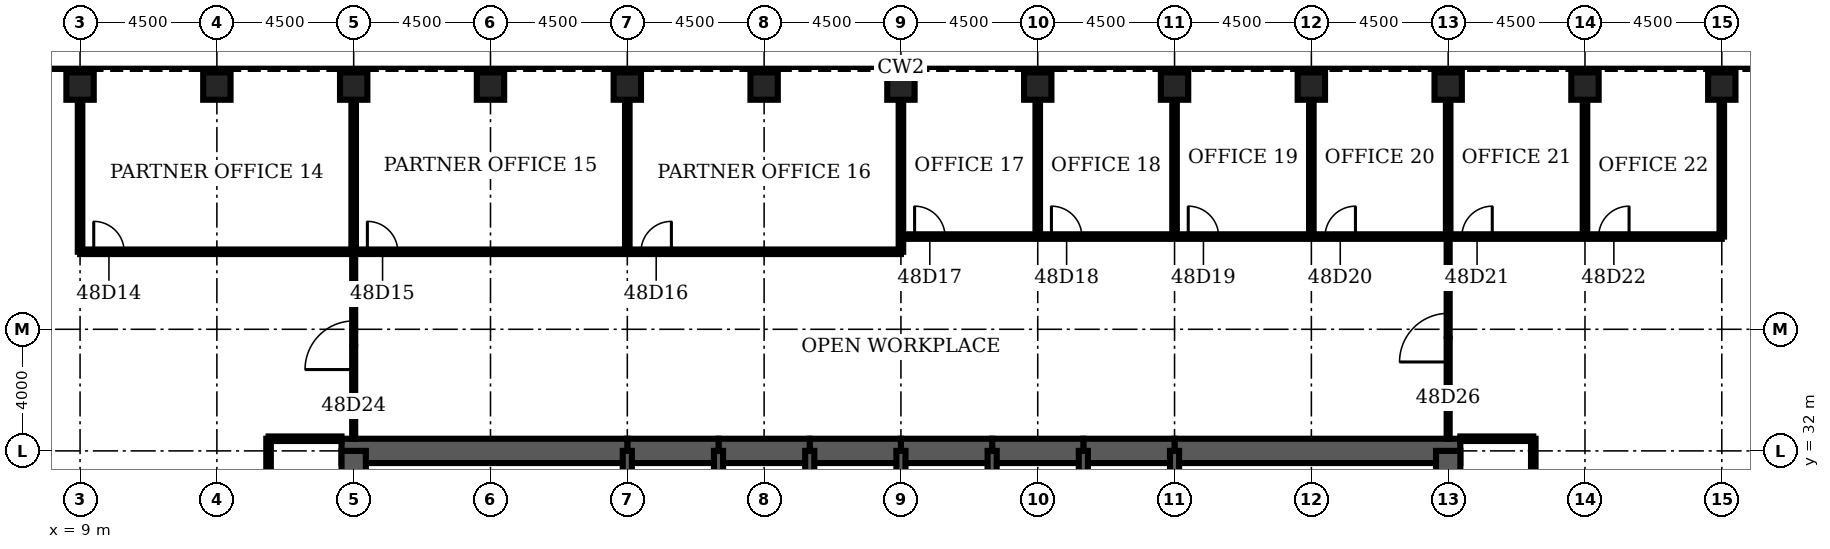
"""IFC4 building model, lengths in metres.
Left out: names, types, materials, properties, quantities, classifications, styles, units other than length and angle.
Written with IfcOpenShell. Run it as: python <this file> out.ifc"""

import sys

from ifc_helpers import new_model, si_unit, direction, frame, frame_2d, origin, origin_2d, place, context, subcontext, project, spatial, rectangle, hollow_rectangle, extrude, element, fill, save


model = new_model("IFC4")
c1 = context("Model", 3, precision=1e-05, world=origin(), true_north=direction((0.0, 1.0)))
c2 = subcontext(c1, "Body", "Model", "MODEL_VIEW")
j1 = project(units=[si_unit("LENGTHUNIT", "METRE"), si_unit("PLANEANGLEUNIT", "RADIAN")], contexts=[c1])
p1 = place(None, origin())
s1 = spatial("IfcSite", under=j1, at=p1, CompositionType="ELEMENT")
p2 = place(p1, origin())
s2 = spatial("IfcBuilding", under=s1, at=p2, CompositionType="ELEMENT")
p3 = place(p2, frame((0.0, 0.0, 215.2)))
s3 = spatial("IfcBuildingStorey", under=s2, at=p3, CompositionType="ELEMENT", Elevation=215.2)
for number, where, z_axis, x_axis in (
    (1, (63.0, 44.0, 0.0), (0.0, 0.0, 1.0), (0.0, 1.0, 0.0)),
    (2, (58.5, 44.0, 0.0), (0.0, 0.0, 1.0), (0.0, 1.0, 0.0)),
    (3, (54.0, 44.0, 0.0), (0.0, 0.0, 1.0), (0.0, 1.0, 0.0)),
    (4, (49.5, 44.0, 0.0), (0.0, 0.0, 1.0), (0.0, 1.0, 0.0)),
    (5, (45.0, 44.0, 0.0), (0.0, 0.0, 1.0), (0.0, 1.0, 0.0)),
    (6, (40.5, 44.0, 0.0), (0.0, 0.0, 1.0), (0.0, 1.0, 0.0)),
    (7, (36.0, 44.0, 0.0), (0.0, 0.0, 1.0), (0.0, 1.0, 0.0)),
    (8, (31.5, 44.0, 0.0), (0.0, 0.0, 1.0), (0.0, 1.0, 0.0)),
    (9, (27.0, 44.0, 0.0), (0.0, 0.0, 1.0), (0.0, 1.0, 0.0)),
    (10, (22.5, 44.0, 0.0), (0.0, 0.0, 1.0), (0.0, 1.0, 0.0)),
    (11, (18.0, 44.0, 0.0), (0.0, 0.0, 1.0), (0.0, 1.0, 0.0)),
    (12, (13.5, 44.0, 0.0), (0.0, 0.0, 1.0), (0.0, 1.0, 0.0)),
    (13, (9.0, 44.0, 0.0), (0.0, 0.0, 1.0), (0.0, 1.0, 0.0)),
):
    element("IfcColumn", number, at=place(p3, frame(where, z_axis=z_axis, x_axis=x_axis)), inside=s3, PredefinedType="COLUMN", context=c2, shape_type="SweptSolid", body=[
        extrude(hollow_rectangle(XDim=0.9, YDim=0.9, WallThickness=0.08, at=origin_2d()), origin(), (0.0, 0.0, 1.0), 4.2),
    ])
p4 = place(p3, frame((54.4, 32.0, 0.0), z_axis=(0.0, 0.0, 1.0), x_axis=(-1.0, 0.0, 0.0)))
e14 = element("IfcWall", 14, at=p4, inside=s3, PredefinedType="SHEAR", context=c2, shape_type="SweptSolid", body=[
    extrude(rectangle(XDim=9.4, YDim=0.8, at=frame_2d((4.7, 0.0))), origin(), (0.0, 0.0, 1.0), 4.2),
])
for number, where, z_axis, x_axis in (
    (15, (45.0, 32.0, 0.0), (0.0, 0.0, 1.0), (-1.0, 0.0, 0.0)),
    (16, (42.0, 32.0, 0.0), (0.0, 0.0, 1.0), (-1.0, 0.0, 0.0)),
    (17, (39.0, 32.0, 0.0), (0.0, 0.0, 1.0), (-1.0, 0.0, 0.0)),
    (18, (36.0, 32.0, 0.0), (0.0, 0.0, 1.0), (-1.0, 0.0, 0.0)),
    (19, (33.0, 32.0, 0.0), (0.0, 0.0, 1.0), (-1.0, 0.0, 0.0)),
    (20, (30.0, 32.0, 0.0), (0.0, 0.0, 1.0), (-1.0, 0.0, 0.0)),
):
    element("IfcWall", number, at=place(p3, frame(where, z_axis=z_axis, x_axis=x_axis)), inside=s3, PredefinedType="SHEAR", context=c2, shape_type="SweptSolid", body=[
        extrude(rectangle(XDim=3.0, YDim=0.8, at=frame_2d((1.5, 0.0))), origin(), (0.0, 0.0, 1.0), 4.2),
    ])
p5 = place(p3, frame((27.0, 32.0, 0.0), z_axis=(0.0, 0.0, 1.0), x_axis=(-1.0, 0.0, 0.0)))
e21 = element("IfcWall", 21, at=p5, inside=s3, PredefinedType="SHEAR", context=c2, shape_type="SweptSolid", body=[
    extrude(rectangle(XDim=9.4, YDim=0.8, at=frame_2d((4.7, 0.0))), origin(), (0.0, 0.0, 1.0), 4.2),
])
for number, where, z_axis, x_axis in (
    (22, (18.0, 32.0, 0.0), (0.0, 0.0, 1.0), (0.0, -1.0, 0.0)),
    (23, (54.0, 28.8, 0.0), (0.0, 0.0, 1.0), (0.0, 1.0, 0.0)),
):
    element("IfcWall", number, at=place(p3, frame(where, z_axis=z_axis, x_axis=x_axis)), inside=s3, PredefinedType="SHEAR", context=c2, shape_type="SweptSolid", body=[
        extrude(rectangle(XDim=3.2, YDim=0.8, at=frame_2d((1.6, 0.0))), origin(), (0.0, 0.0, 1.0), 4.2),
    ])
for number, where, z_axis, x_axis in (
    (24, (27.0, 28.8, 0.0), (0.0, 0.0, 1.0), (0.0, 1.0, 0.0)),
    (25, (30.0, 28.8, 0.0), (0.0, 0.0, 1.0), (0.0, 1.0, 0.0)),
    (26, (33.0, 28.8, 0.0), (0.0, 0.0, 1.0), (0.0, 1.0, 0.0)),
    (27, (36.0, 28.8, 0.0), (0.0, 0.0, 1.0), (0.0, 1.0, 0.0)),
    (28, (39.0, 28.8, 0.0), (0.0, 0.0, 1.0), (0.0, 1.0, 0.0)),
    (29, (42.0, 28.8, 0.0), (0.0, 0.0, 1.0), (0.0, 1.0, 0.0)),
    (30, (45.0, 28.8, 0.0), (0.0, 0.0, 1.0), (0.0, 1.0, 0.0)),
):
    element("IfcWall", number, at=place(p3, frame(where, z_axis=z_axis, x_axis=x_axis)), inside=s3, PredefinedType="SOLIDWALL", context=c2, shape_type="SweptSolid", body=[
        extrude(rectangle(XDim=3.2, YDim=0.3, at=frame_2d((1.6, 0.0))), origin(), (0.0, 0.0, 1.0), 4.2),
    ])
for number, where, z_axis, x_axis in (
    (31, (15.2, 32.4, 0.0), (0.0, 0.0, 1.0), (1.0, 0.0, 0.0)),
    (32, (54.4, 32.4, 0.0), (0.0, 0.0, 1.0), (1.0, 0.0, 0.0)),
):
    element("IfcWall", number, at=place(p3, frame(where, z_axis=z_axis, x_axis=x_axis)), inside=s3, PredefinedType="PARTITIONING", context=c2, shape_type="SweptSolid", body=[
        extrude(rectangle(XDim=2.4, YDim=0.15, at=frame_2d((1.2, 0.0))), origin(), (0.0, 0.0, 1.0), 3.0),
    ])
p6 = place(p3, frame((9.0, 38.55, 0.0), z_axis=(0.0, 0.0, 1.0), x_axis=(1.0, 0.0, 0.0)))
e33 = element("IfcWall", 33, at=p6, inside=s3, PredefinedType="PARTITIONING", context=c2, shape_type="SweptSolid", body=[
    extrude(rectangle(XDim=27.0, YDim=0.15, at=frame_2d((13.5, 0.0))), origin(), (0.0, 0.0, 1.0), 3.0),
])
p7 = place(p6, frame((0.45, 0.0, 0.0)))
e34 = element("IfcOpeningElement", 34, at=p7, cuts=e33, PredefinedType="OPENING", context=c2, shape_type="SweptSolid", body=[
    extrude(rectangle(XDim=1.0, YDim=2.1, at=frame_2d((0.5, 1.05))), frame((0.0, 0.085, 0.0), z_axis=(0.0, -1.0, 0.0), x_axis=(1.0, 0.0, 0.0)), (0.0, 0.0, 1.0), 0.17),
])
p8 = place(p6, frame((9.45, 0.0, 0.0)))
e35 = element("IfcOpeningElement", 35, at=p8, cuts=e33, PredefinedType="OPENING", context=c2, shape_type="SweptSolid", body=[
    extrude(rectangle(XDim=1.0, YDim=2.1, at=frame_2d((0.5, 1.05))), frame((0.0, 0.085, 0.0), z_axis=(0.0, -1.0, 0.0), x_axis=(1.0, 0.0, 0.0)), (0.0, 0.0, 1.0), 0.17),
])
p9 = place(p6, frame((18.45, 0.0, 0.0)))
e36 = element("IfcOpeningElement", 36, at=p9, cuts=e33, PredefinedType="OPENING", context=c2, shape_type="SweptSolid", body=[
    extrude(rectangle(XDim=1.0, YDim=2.1, at=frame_2d((0.5, 1.05))), frame((0.0, 0.085, 0.0), z_axis=(0.0, -1.0, 0.0), x_axis=(1.0, 0.0, 0.0)), (0.0, 0.0, 1.0), 0.17),
])
p10 = place(p3, frame((36.0, 39.05, 0.0), z_axis=(0.0, 0.0, 1.0), x_axis=(1.0, 0.0, 0.0)))
e37 = element("IfcWall", 37, at=p10, inside=s3, PredefinedType="PARTITIONING", context=c2, shape_type="SweptSolid", body=[
    extrude(rectangle(XDim=27.0, YDim=0.15, at=frame_2d((13.5, 0.0))), origin(), (0.0, 0.0, 1.0), 3.0),
])
p11 = place(p10, frame((0.45, 0.0, 0.0)))
e38 = element("IfcOpeningElement", 38, at=p11, cuts=e37, PredefinedType="OPENING", context=c2, shape_type="SweptSolid", body=[
    extrude(rectangle(XDim=1.0, YDim=2.1, at=frame_2d((0.5, 1.05))), frame((0.0, 0.085, 0.0), z_axis=(0.0, -1.0, 0.0), x_axis=(1.0, 0.0, 0.0)), (0.0, 0.0, 1.0), 0.17),
])
p12 = place(p10, frame((4.95, 0.0, 0.0)))
e39 = element("IfcOpeningElement", 39, at=p12, cuts=e37, PredefinedType="OPENING", context=c2, shape_type="SweptSolid", body=[
    extrude(rectangle(XDim=1.0, YDim=2.1, at=frame_2d((0.5, 1.05))), frame((0.0, 0.085, 0.0), z_axis=(0.0, -1.0, 0.0), x_axis=(1.0, 0.0, 0.0)), (0.0, 0.0, 1.0), 0.17),
])
p13 = place(p10, frame((9.45, 0.0, 0.0)))
e40 = element("IfcOpeningElement", 40, at=p13, cuts=e37, PredefinedType="OPENING", context=c2, shape_type="SweptSolid", body=[
    extrude(rectangle(XDim=1.0, YDim=2.1, at=frame_2d((0.5, 1.05))), frame((0.0, 0.085, 0.0), z_axis=(0.0, -1.0, 0.0), x_axis=(1.0, 0.0, 0.0)), (0.0, 0.0, 1.0), 0.17),
])
p14 = place(p10, frame((13.95, 0.0, 0.0)))
e41 = element("IfcOpeningElement", 41, at=p14, cuts=e37, PredefinedType="OPENING", context=c2, shape_type="SweptSolid", body=[
    extrude(rectangle(XDim=1.0, YDim=2.1, at=frame_2d((0.5, 1.05))), frame((0.0, 0.085, 0.0), z_axis=(0.0, -1.0, 0.0), x_axis=(1.0, 0.0, 0.0)), (0.0, 0.0, 1.0), 0.17),
])
p15 = place(p10, frame((18.45, 0.0, 0.0)))
e42 = element("IfcOpeningElement", 42, at=p15, cuts=e37, PredefinedType="OPENING", context=c2, shape_type="SweptSolid", body=[
    extrude(rectangle(XDim=1.0, YDim=2.1, at=frame_2d((0.5, 1.05))), frame((0.0, 0.085, 0.0), z_axis=(0.0, -1.0, 0.0), x_axis=(1.0, 0.0, 0.0)), (0.0, 0.0, 1.0), 0.17),
])
p16 = place(p10, frame((22.95, 0.0, 0.0)))
e43 = element("IfcOpeningElement", 43, at=p16, cuts=e37, PredefinedType="OPENING", context=c2, shape_type="SweptSolid", body=[
    extrude(rectangle(XDim=1.0, YDim=2.1, at=frame_2d((0.5, 1.05))), frame((0.0, 0.085, 0.0), z_axis=(0.0, -1.0, 0.0), x_axis=(1.0, 0.0, 0.0)), (0.0, 0.0, 1.0), 0.17),
])
p17 = place(p3, frame((9.0, 38.55, 0.0), z_axis=(0.0, 0.0, 1.0), x_axis=(0.0, 1.0, 0.0)))
e44 = element("IfcWall", 44, at=p17, inside=s3, PredefinedType="PARTITIONING", context=c2, shape_type="SweptSolid", body=[
    extrude(rectangle(XDim=5.0, YDim=0.15, at=frame_2d((2.5, 0.0))), origin(), (0.0, 0.0, 1.0), 3.0),
])
p18 = place(p3, frame((15.2, 13.8, 0.0), z_axis=(0.0, 0.0, 1.0), x_axis=(0.0, 1.0, 0.0)))
e45 = element("IfcWall", 45, at=p18, inside=s3, PredefinedType="PARTITIONING", context=c2, shape_type="SweptSolid", body=[
    extrude(rectangle(XDim=18.6, YDim=0.15, at=frame_2d((9.3, 0.0))), origin(), (0.0, 0.0, 1.0), 3.0),
])
p19 = place(p18, frame((8.7, 0.0, 0.0)))
e46 = element("IfcOpeningElement", 46, at=p19, cuts=e45, PredefinedType="OPENING", context=c2, shape_type="SweptSolid", body=[
    extrude(rectangle(XDim=1.2, YDim=2.1, at=frame_2d((0.6, 1.05))), frame((0.0, 0.085, 0.0), z_axis=(0.0, -1.0, 0.0), x_axis=(1.0, 0.0, 0.0)), (0.0, 0.0, 1.0), 0.17),
])
p20 = place(p3, frame((18.0, 32.4, 0.0), z_axis=(0.0, 0.0, 1.0), x_axis=(0.0, 1.0, 0.0)))
e47 = element("IfcWall", 47, at=p20, inside=s3, PredefinedType="PARTITIONING", context=c2, shape_type="SweptSolid", body=[
    extrude(rectangle(XDim=6.15, YDim=0.1, at=frame_2d((3.075, 0.0))), origin(), (0.0, 0.0, 1.0), 3.0),
])
p21 = place(p20, frame((2.275, 0.0, 0.0)))
e48 = element("IfcOpeningElement", 48, at=p21, cuts=e47, PredefinedType="OPENING", context=c2, shape_type="SweptSolid", body=[
    extrude(rectangle(XDim=1.6, YDim=2.1, at=frame_2d((0.8, 1.05))), frame((0.0, 0.06, 0.0), z_axis=(0.0, -1.0, 0.0), x_axis=(1.0, 0.0, 0.0)), (0.0, 0.0, 1.0), 0.12),
])
for number, where, z_axis, x_axis in (
    (49, (18.0, 38.55, 0.0), (0.0, 0.0, 1.0), (0.0, 1.0, 0.0)),
    (50, (27.0, 38.55, 0.0), (0.0, 0.0, 1.0), (0.0, 1.0, 0.0)),
    (51, (36.0, 38.55, 0.0), (0.0, 0.0, 1.0), (0.0, 1.0, 0.0)),
):
    element("IfcWall", number, at=place(p3, frame(where, z_axis=z_axis, x_axis=x_axis)), inside=s3, PredefinedType="PARTITIONING", context=c2, shape_type="SweptSolid", body=[
        extrude(rectangle(XDim=5.0, YDim=0.15, at=frame_2d((2.5, 0.0))), origin(), (0.0, 0.0, 1.0), 3.0),
    ])
for number, where, z_axis, x_axis in (
    (52, (40.5, 39.05, 0.0), (0.0, 0.0, 1.0), (0.0, 1.0, 0.0)),
    (53, (45.0, 39.05, 0.0), (0.0, 0.0, 1.0), (0.0, 1.0, 0.0)),
    (54, (49.5, 39.05, 0.0), (0.0, 0.0, 1.0), (0.0, 1.0, 0.0)),
):
    element("IfcWall", number, at=place(p3, frame(where, z_axis=z_axis, x_axis=x_axis)), inside=s3, PredefinedType="PARTITIONING", context=c2, shape_type="SweptSolid", body=[
        extrude(rectangle(XDim=4.5, YDim=0.15, at=frame_2d((2.25, 0.0))), origin(), (0.0, 0.0, 1.0), 3.0),
    ])
p22 = place(p3, frame((54.0, 32.4, 0.0), z_axis=(0.0, 0.0, 1.0), x_axis=(0.0, 1.0, 0.0)))
e55 = element("IfcWall", 55, at=p22, inside=s3, PredefinedType="PARTITIONING", context=c2, shape_type="SweptSolid", body=[
    extrude(rectangle(XDim=6.65, YDim=0.1, at=frame_2d((3.325, 0.0))), origin(), (0.0, 0.0, 1.0), 3.0),
])
p23 = place(p22, frame((2.525, 0.0, 0.0)))
e56 = element("IfcOpeningElement", 56, at=p23, cuts=e55, PredefinedType="OPENING", context=c2, shape_type="SweptSolid", body=[
    extrude(rectangle(XDim=1.6, YDim=2.1, at=frame_2d((0.8, 1.05))), frame((0.0, 0.06, 0.0), z_axis=(0.0, -1.0, 0.0), x_axis=(1.0, 0.0, 0.0)), (0.0, 0.0, 1.0), 0.12),
])
p24 = place(p3, frame((54.0, 39.05, 0.0), z_axis=(0.0, 0.0, 1.0), x_axis=(0.0, 1.0, 0.0)))
e57 = element("IfcWall", 57, at=p24, inside=s3, PredefinedType="PARTITIONING", context=c2, shape_type="SweptSolid", body=[
    extrude(rectangle(XDim=4.5, YDim=0.15, at=frame_2d((2.25, 0.0))), origin(), (0.0, 0.0, 1.0), 3.0),
])
p25 = place(p3, frame((56.8, 13.8, 0.0), z_axis=(0.0, 0.0, 1.0), x_axis=(0.0, 1.0, 0.0)))
e58 = element("IfcWall", 58, at=p25, inside=s3, PredefinedType="PARTITIONING", context=c2, shape_type="SweptSolid", body=[
    extrude(rectangle(XDim=18.6, YDim=0.15, at=frame_2d((9.3, 0.0))), origin(), (0.0, 0.0, 1.0), 3.0),
])
p26 = place(p25, frame((8.7, 0.0, 0.0)))
e59 = element("IfcOpeningElement", 59, at=p26, cuts=e58, PredefinedType="OPENING", context=c2, shape_type="SweptSolid", body=[
    extrude(rectangle(XDim=1.2, YDim=2.1, at=frame_2d((0.6, 1.05))), frame((0.0, 0.085, 0.0), z_axis=(0.0, -1.0, 0.0), x_axis=(1.0, 0.0, 0.0)), (0.0, 0.0, 1.0), 0.17),
])
for number, where, z_axis, x_axis in (
    (60, (58.5, 39.05, 0.0), (0.0, 0.0, 1.0), (0.0, 1.0, 0.0)),
    (61, (63.0, 39.05, 0.0), (0.0, 0.0, 1.0), (0.0, 1.0, 0.0)),
):
    element("IfcWall", number, at=place(p3, frame(where, z_axis=z_axis, x_axis=x_axis)), inside=s3, PredefinedType="PARTITIONING", context=c2, shape_type="SweptSolid", body=[
        extrude(rectangle(XDim=4.5, YDim=0.15, at=frame_2d((2.25, 0.0))), origin(), (0.0, 0.0, 1.0), 3.0),
    ])
p27 = place(p7, origin())
e62 = element("IfcDoor", 62, at=p27, inside=s3, OperationType="SINGLE_SWING_LEFT", PredefinedType="DOOR", context=c2, shape_type="SweptSolid", body=[
    extrude(rectangle(XDim=1.0, YDim=2.1, at=frame_2d((0.5, 1.05))), frame((0.0, 0.025, 0.0), z_axis=(0.0, -1.0, 0.0), x_axis=(1.0, 0.0, 0.0)), (0.0, 0.0, 1.0), 0.05),
])
fill(e34, e62)
p28 = place(p8, origin())
e63 = element("IfcDoor", 63, at=p28, inside=s3, OperationType="SINGLE_SWING_LEFT", PredefinedType="DOOR", context=c2, shape_type="SweptSolid", body=[
    extrude(rectangle(XDim=1.0, YDim=2.1, at=frame_2d((0.5, 1.05))), frame((0.0, 0.025, 0.0), z_axis=(0.0, -1.0, 0.0), x_axis=(1.0, 0.0, 0.0)), (0.0, 0.0, 1.0), 0.05),
])
fill(e35, e63)
p29 = place(p9, origin())
e64 = element("IfcDoor", 64, at=p29, inside=s3, OperationType="SINGLE_SWING_RIGHT", PredefinedType="DOOR", context=c2, shape_type="SweptSolid", body=[
    extrude(rectangle(XDim=1.0, YDim=2.1, at=frame_2d((0.5, 1.05))), frame((0.0, 0.025, 0.0), z_axis=(0.0, -1.0, 0.0), x_axis=(1.0, 0.0, 0.0)), (0.0, 0.0, 1.0), 0.05),
])
fill(e36, e64)
p30 = place(p11, origin())
e65 = element("IfcDoor", 65, at=p30, inside=s3, OperationType="SINGLE_SWING_LEFT", PredefinedType="DOOR", context=c2, shape_type="SweptSolid", body=[
    extrude(rectangle(XDim=1.0, YDim=2.1, at=frame_2d((0.5, 1.05))), frame((0.0, 0.025, 0.0), z_axis=(0.0, -1.0, 0.0), x_axis=(1.0, 0.0, 0.0)), (0.0, 0.0, 1.0), 0.05),
])
fill(e38, e65)
p31 = place(p12, origin())
e66 = element("IfcDoor", 66, at=p31, inside=s3, OperationType="SINGLE_SWING_LEFT", PredefinedType="DOOR", context=c2, shape_type="SweptSolid", body=[
    extrude(rectangle(XDim=1.0, YDim=2.1, at=frame_2d((0.5, 1.05))), frame((0.0, 0.025, 0.0), z_axis=(0.0, -1.0, 0.0), x_axis=(1.0, 0.0, 0.0)), (0.0, 0.0, 1.0), 0.05),
])
fill(e39, e66)
p32 = place(p13, origin())
e67 = element("IfcDoor", 67, at=p32, inside=s3, OperationType="SINGLE_SWING_LEFT", PredefinedType="DOOR", context=c2, shape_type="SweptSolid", body=[
    extrude(rectangle(XDim=1.0, YDim=2.1, at=frame_2d((0.5, 1.05))), frame((0.0, 0.025, 0.0), z_axis=(0.0, -1.0, 0.0), x_axis=(1.0, 0.0, 0.0)), (0.0, 0.0, 1.0), 0.05),
])
fill(e40, e67)
p33 = place(p14, origin())
e68 = element("IfcDoor", 68, at=p33, inside=s3, OperationType="SINGLE_SWING_RIGHT", PredefinedType="DOOR", context=c2, shape_type="SweptSolid", body=[
    extrude(rectangle(XDim=1.0, YDim=2.1, at=frame_2d((0.5, 1.05))), frame((0.0, 0.025, 0.0), z_axis=(0.0, -1.0, 0.0), x_axis=(1.0, 0.0, 0.0)), (0.0, 0.0, 1.0), 0.05),
])
fill(e41, e68)
p34 = place(p15, origin())
e69 = element("IfcDoor", 69, at=p34, inside=s3, OperationType="SINGLE_SWING_RIGHT", PredefinedType="DOOR", context=c2, shape_type="SweptSolid", body=[
    extrude(rectangle(XDim=1.0, YDim=2.1, at=frame_2d((0.5, 1.05))), frame((0.0, 0.025, 0.0), z_axis=(0.0, -1.0, 0.0), x_axis=(1.0, 0.0, 0.0)), (0.0, 0.0, 1.0), 0.05),
])
fill(e42, e69)
p35 = place(p16, origin())
e70 = element("IfcDoor", 70, at=p35, inside=s3, OperationType="SINGLE_SWING_RIGHT", PredefinedType="DOOR", context=c2, shape_type="SweptSolid", body=[
    extrude(rectangle(XDim=1.0, YDim=2.1, at=frame_2d((0.5, 1.05))), frame((0.0, 0.025, 0.0), z_axis=(0.0, -1.0, 0.0), x_axis=(1.0, 0.0, 0.0)), (0.0, 0.0, 1.0), 0.05),
])
fill(e43, e70)
p36 = place(p21, origin())
e71 = element("IfcDoor", 71, at=p36, inside=s3, OperationType="SINGLE_SWING_LEFT", PredefinedType="DOOR", context=c2, shape_type="SweptSolid", body=[
    extrude(rectangle(XDim=1.6, YDim=2.1, at=frame_2d((0.8, 1.05))), frame((0.0, 0.025, 0.0), z_axis=(0.0, -1.0, 0.0), x_axis=(1.0, 0.0, 0.0)), (0.0, 0.0, 1.0), 0.05),
])
fill(e48, e71)
p37 = place(p23, origin())
e72 = element("IfcDoor", 72, at=p37, inside=s3, OperationType="SINGLE_SWING_LEFT", PredefinedType="DOOR", context=c2, shape_type="SweptSolid", body=[
    extrude(rectangle(XDim=1.6, YDim=2.1, at=frame_2d((0.8, 1.05))), frame((0.0, 0.025, 0.0), z_axis=(0.0, -1.0, 0.0), x_axis=(1.0, 0.0, 0.0)), (0.0, 0.0, 1.0), 0.05),
])
fill(e56, e72)
save(model, sys.argv[1])
